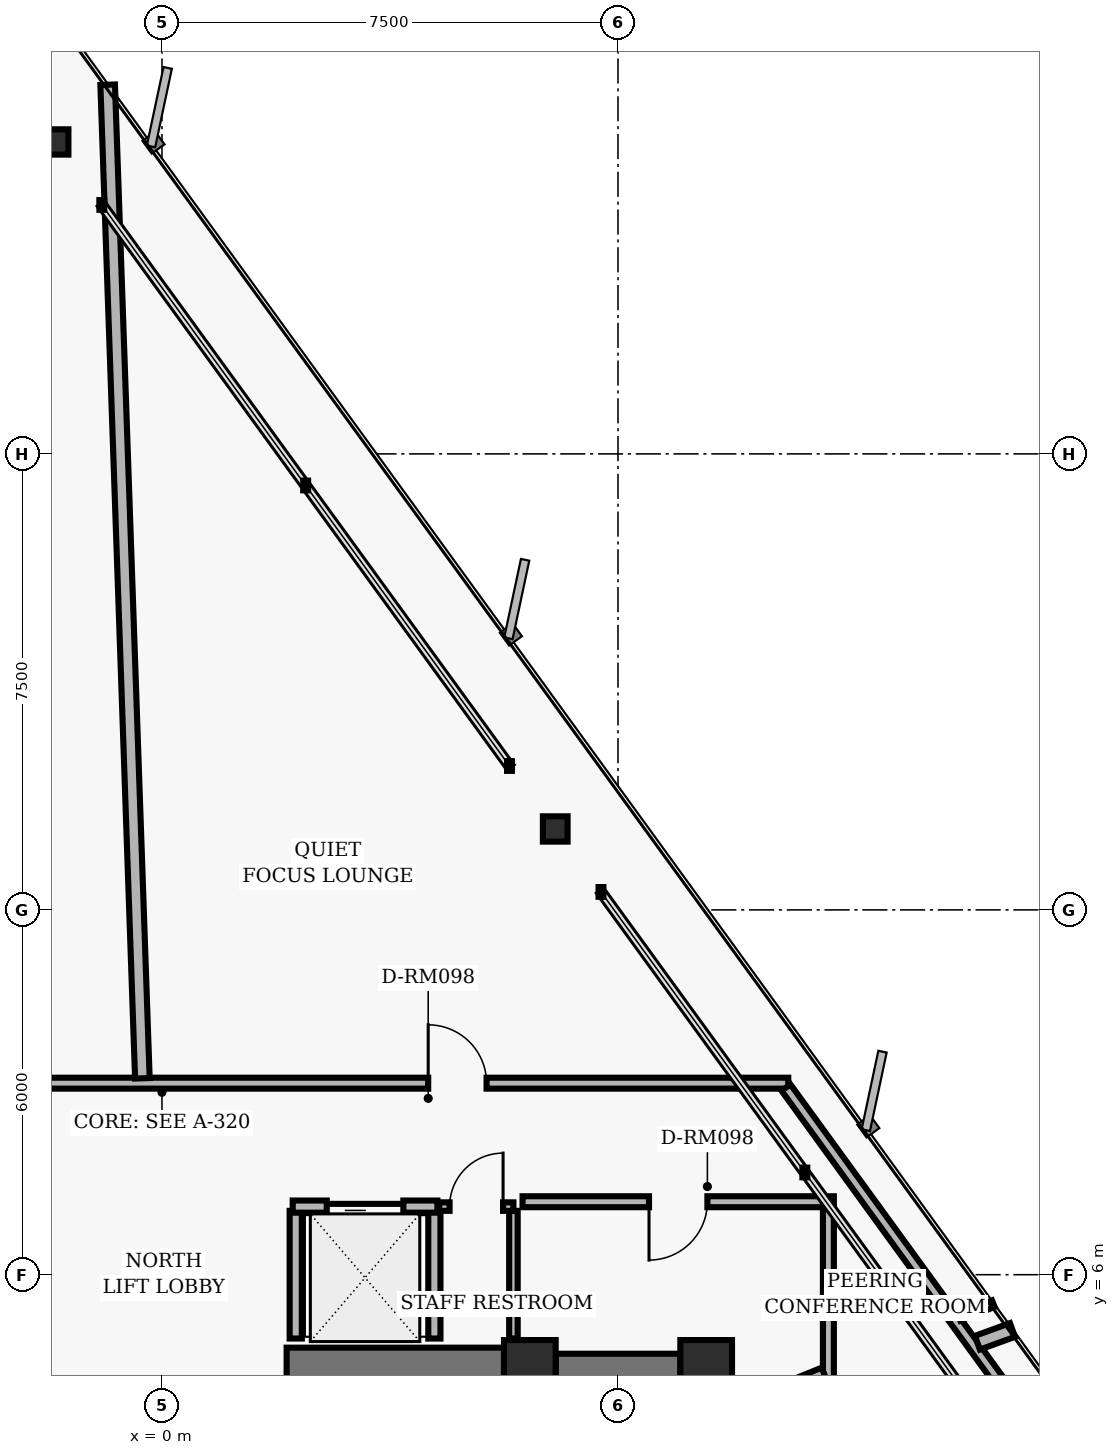
"""IFC4 building model, lengths in metres.
Left out: names, types, materials, properties, quantities, classifications, styles, units other than length and angle.
Written with IfcOpenShell. Run it as: python <this file> out.ifc"""

import sys

from ifc_helpers import new_model, si_unit, direction, frame, frame_2d, origin, origin_2d, place, context, subcontext, project, spatial, rectangle, hollow_rectangle, i_section, extrude, element, fill, save


model = new_model("IFC4")
c1 = context("Model", 3, precision=1e-05, world=origin(), true_north=direction((0.0, 1.0)))
c2 = subcontext(c1, "Body", "Model", "MODEL_VIEW")
j1 = project(units=[si_unit("LENGTHUNIT", "METRE"), si_unit("PLANEANGLEUNIT", "RADIAN")], contexts=[c1])
p1 = place(None, origin())
s1 = spatial("IfcSite", under=j1, at=p1, CompositionType="ELEMENT")
p2 = place(p1, origin())
s2 = spatial("IfcBuilding", under=s1, at=p2, CompositionType="ELEMENT")
p3 = place(p2, frame((0.0, 0.0, 122.88)))
s3 = spatial("IfcBuildingStorey", under=s2, at=p3, CompositionType="ELEMENT", Elevation=122.88)
for number, where, z_axis, x_axis in (
    (1, (6.05, 4.5, 0.0), (0.0, 0.0, 1.0), (1.0, 0.0, 0.0)),
    (2, (8.95, 4.5, 0.0), (0.0, 0.0, 1.0), (1.0, 0.0, 0.0)),
):
    element("IfcColumn", number, at=place(p3, frame(where, z_axis=z_axis, x_axis=x_axis)), inside=s3, PredefinedType="COLUMN", context=c2, shape_type="SweptSolid", body=[
        extrude(hollow_rectangle(XDim=0.85, YDim=0.85, WallThickness=0.055, InnerFilletRadius=0.02, OuterFilletRadius=0.04, at=origin_2d()), origin(), (0.0, 0.0, 1.0), 3.04),
    ])
p4 = place(p3, frame((2.05, 4.5, 0.0), z_axis=(0.0, 0.0, 1.0), x_axis=(1.0, 0.0, 0.0)))
e3 = element("IfcWall", 3, at=p4, inside=s3, PredefinedType="SHEAR", context=c2, shape_type="SweptSolid", body=[
    extrude(rectangle(XDim=3.575, YDim=0.6, at=frame_2d((1.788, 0.0))), origin(), (0.0, 0.0, 1.0), 2.618),
])
p5 = place(p3, frame((6.475, 4.5, 0.0), z_axis=(0.0, 0.0, 1.0), x_axis=(1.0, 0.0, 0.0)))
e4 = element("IfcWall", 4, at=p5, inside=s3, PredefinedType="SHEAR", context=c2, shape_type="SweptSolid", body=[
    extrude(rectangle(XDim=2.05, YDim=0.4, at=frame_2d((1.025, 0.0))), origin(), (0.0, 0.0, 1.0), 2.618),
])
for number, where, z_axis, x_axis in (
    (5, (6.468, 13.331, 0.0), (0.0, 0.0, 1.0), (1.0, 0.0, 0.0)),
    (6, (-1.742, 24.63, 0.0), (0.0, 0.0, 1.0), (1.0, 0.0, 0.0)),
):
    element("IfcColumn", number, at=place(p3, frame(where, z_axis=z_axis, x_axis=x_axis)), inside=s3, PredefinedType="COLUMN", context=c2, shape_type="SweptSolid", body=[
        extrude(i_section(OverallWidth=0.406, OverallDepth=0.416, WebThickness=0.03, FlangeThickness=0.048, FilletRadius=0.02, at=origin_2d()), origin(), (0.0, 0.0, 1.0), 3.04),
    ])
p6 = place(p3, frame((2.2, 4.95, 0.0), z_axis=(0.0, 0.0, 1.0), x_axis=(0.0, 1.0, 0.0)))
e7 = element("IfcWall", 7, at=p6, inside=s3, PredefinedType="PARTITIONING", context=c2, shape_type="SweptSolid", body=[
    extrude(rectangle(XDim=2.1, YDim=0.2, at=frame_2d((1.05, 0.0))), origin(), (0.0, 0.0, 1.0), 1.962),
])
p7 = place(p3, frame((4.48, 4.95, 0.0), z_axis=(0.0, 0.0, 1.0), x_axis=(0.0, 1.0, 0.0)))
e8 = element("IfcWall", 8, at=p7, inside=s3, PredefinedType="PARTITIONING", context=c2, shape_type="SweptSolid", body=[
    extrude(rectangle(XDim=2.1, YDim=0.2, at=frame_2d((1.05, 0.0))), origin(), (0.0, 0.0, 1.0), 2.593),
])
p8 = place(p3, frame((2.15, 7.12, 0.0), z_axis=(0.0, 0.0, 1.0), x_axis=(1.0, 0.0, 0.0)))
e9 = element("IfcWall", 9, at=p8, inside=s3, PredefinedType="PARTITIONING", context=c2, shape_type="SweptSolid", body=[
    extrude(rectangle(XDim=2.38, YDim=0.2, at=frame_2d((1.19, 0.0))), origin(), (0.0, 0.0, 1.0), 2.593),
])
p9 = place(p8, frame((0.56, 0.0, 0.0)))
e10 = element("IfcOpeningElement", 10, at=p9, cuts=e9, PredefinedType="OPENING", context=c2, shape_type="SweptSolid", body=[
    extrude(rectangle(XDim=1.26, YDim=2.06, at=frame_2d((0.63, 1.03))), frame((0.0, 0.11, 0.0), z_axis=(0.0, -1.0, 0.0), x_axis=(1.0, 0.0, 0.0)), (0.0, 0.0, 1.0), 0.22),
])
p10 = place(p3, frame((5.78, 4.95, 0.0), z_axis=(0.0, 0.0, 1.0), x_axis=(0.0, 1.0, 0.0)))
e11 = element("IfcWall", 11, at=p10, inside=s3, PredefinedType="PARTITIONING", context=c2, shape_type="SweptSolid", body=[
    extrude(rectangle(XDim=2.1, YDim=0.14, at=frame_2d((1.05, 0.0))), origin(), (0.0, 0.0, 1.0), 1.962),
])
p11 = place(p3, frame((4.56, 7.12, 0.0), z_axis=(0.0, 0.0, 1.0), x_axis=(1.0, 0.0, 0.0)))
e12 = element("IfcWall", 12, at=p11, inside=s3, PredefinedType="PARTITIONING", context=c2, shape_type="SweptSolid", body=[
    extrude(rectangle(XDim=1.22, YDim=0.14, at=frame_2d((0.61, 0.0))), origin(), (0.0, 0.0, 1.0), 2.593),
])
p12 = place(p11, frame((0.17, 0.0, 0.0)))
e13 = element("IfcOpeningElement", 13, at=p12, cuts=e12, PredefinedType="OPENING", context=c2, shape_type="SweptSolid", body=[
    extrude(rectangle(XDim=0.88, YDim=2.02, at=frame_2d((0.44, 1.01))), frame((0.0, 0.08, 0.0), z_axis=(0.0, -1.0, 0.0), x_axis=(1.0, 0.0, 0.0)), (0.0, 0.0, 1.0), 0.16),
])
p13 = place(p3, frame((-6.52, 9.15, 0.0), z_axis=(0.0, 0.0, 1.0), x_axis=(1.0, 0.0, 0.0)))
e14 = element("IfcWall", 14, at=p13, inside=s3, PredefinedType="PARTITIONING", context=c2, shape_type="SweptSolid", body=[
    extrude(rectangle(XDim=16.82, YDim=0.18, at=frame_2d((8.41, 0.0))), origin(), (0.0, 0.0, 1.0), 2.593),
])
p14 = place(p13, frame((10.898, 0.0, 0.0)))
e15 = element("IfcOpeningElement", 15, at=p14, cuts=e14, PredefinedType="OPENING", context=c2, shape_type="SweptSolid", body=[
    extrude(rectangle(XDim=0.96, YDim=2.02, at=frame_2d((0.48, 1.01))), frame((0.0, 0.1, 0.0), z_axis=(0.0, -1.0, 0.0), x_axis=(1.0, 0.0, 0.0)), (0.0, 0.0, 1.0), 0.2),
])
p15 = place(p13, frame((2.749, 0.0, 0.0)))
e16 = element("IfcOpeningElement", 16, at=p15, cuts=e14, PredefinedType="OPENING", context=c2, shape_type="SweptSolid", body=[
    extrude(rectangle(XDim=0.96, YDim=2.02, at=frame_2d((0.48, 1.01))), frame((0.0, 0.1, 0.0), z_axis=(0.0, -1.0, 0.0), x_axis=(1.0, 0.0, 0.0)), (0.0, 0.0, 1.0), 0.2),
])
p16 = place(p3, frame((10.263, 9.077, 0.0), z_axis=(0.0, 0.0, 1.0), x_axis=(0.587780951295, -0.809020119215, 0.0)))
e17 = element("IfcWall", 17, at=p16, inside=s3, PredefinedType="PARTITIONING", context=c2, shape_type="SweptSolid", body=[
    extrude(rectangle(XDim=7.469, YDim=0.18, at=frame_2d((3.734, 0.0))), origin(), (0.0, 0.0, 1.0), 2.593),
])
p17 = place(p3, frame((10.96, 3.84, 0.0), z_axis=(0.0, 0.0, 1.0), x_axis=(0.0, 1.0, 0.0)))
e18 = element("IfcWall", 18, at=p17, inside=s3, PredefinedType="PARTITIONING", context=c2, shape_type="SweptSolid", body=[
    extrude(rectangle(XDim=3.271, YDim=0.18, at=frame_2d((1.635, 0.0))), origin(), (0.0, 0.0, 1.0), 2.593),
])
p18 = place(p3, frame((11.05, 7.2, 0.0), z_axis=(0.0, 0.0, 1.0), x_axis=(-1.0, 0.0, 0.0)))
e19 = element("IfcWall", 19, at=p18, inside=s3, PredefinedType="PARTITIONING", context=c2, shape_type="SweptSolid", body=[
    extrude(rectangle(XDim=5.12, YDim=0.18, at=frame_2d((2.56, 0.0))), origin(), (0.0, 0.0, 1.0), 2.593),
])
p19 = place(p18, frame((2.08, 0.0, 0.0)))
e20 = element("IfcOpeningElement", 20, at=p19, cuts=e19, PredefinedType="OPENING", context=c2, shape_type="SweptSolid", body=[
    extrude(rectangle(XDim=0.96, YDim=2.02, at=frame_2d((0.48, 1.01))), frame((0.0, 0.1, 0.0), z_axis=(0.0, -1.0, 0.0), x_axis=(1.0, 0.0, 0.0)), (0.0, 0.0, 1.0), 0.2),
])
p20 = place(p3, frame((13.41, 4.881, 0.0), z_axis=(0.0, 0.0, 1.0), x_axis=(0.939828255983, 0.341647258523, 0.0)))
e21 = element("IfcWall", 21, at=p20, inside=s3, PredefinedType="PARTITIONING", context=c2, shape_type="SweptSolid", body=[
    extrude(rectangle(XDim=0.614, YDim=0.24, at=frame_2d((0.307, 0.0))), origin(), (0.0, 0.0, 1.0), 2.593),
])
p21 = place(p3, frame((10.024, 4.05, 0.0), z_axis=(0.0, 0.0, 1.0), x_axis=(0.927194137639, 0.374581140912, 0.0)))
e22 = element("IfcWall", 22, at=p21, inside=s3, PredefinedType="PARTITIONING", context=c2, shape_type="SweptSolid", body=[
    extrude(rectangle(XDim=0.923, YDim=0.16, at=frame_2d((0.461, 0.0))), origin(), (0.0, 0.0, 1.0), 2.593),
])
p22 = place(p3, frame((13.109, 5.296, 0.0), z_axis=(0.0, 0.0, 1.0), x_axis=(0.927169426613, 0.374642301875, 0.0)))
e23 = element("IfcWall", 23, at=p22, inside=s3, PredefinedType="MOVABLE", context=c2, shape_type="SweptSolid", body=[
    extrude(rectangle(XDim=0.608, YDim=0.115, at=frame_2d((0.304, 0.0))), origin(), (0.0, 0.0, 1.0), 2.593),
])
p23 = place(p3, frame((-0.322, 9.23, 0.0), z_axis=(0.0, 0.0, 1.0), x_axis=(-0.034907078812, 0.999390562217, 0.0)))
e24 = element("IfcWall", 24, at=p23, inside=s3, PredefinedType="PARTITIONING", context=c2, shape_type="SweptSolid", body=[
    extrude(rectangle(XDim=16.352, YDim=0.24, at=frame_2d((8.176, 0.0))), origin(), (0.0, 0.0, 1.0), 1.962),
])
p24 = place(p9, origin())
e25 = element("IfcDoor", 25, at=p24, inside=s3, OperationType="SLIDING_TO_LEFT", PredefinedType="DOOR", context=c2, shape_type="SweptSolid", body=[
    extrude(rectangle(XDim=1.26, YDim=2.06, at=frame_2d((0.63, 1.03))), frame((0.0, 0.025, 0.0), z_axis=(0.0, -1.0, 0.0), x_axis=(1.0, 0.0, 0.0)), (0.0, 0.0, 1.0), 0.05),
])
fill(e10, e25)
p25 = place(p12, origin())
e26 = element("IfcDoor", 26, at=p25, inside=s3, OperationType="SINGLE_SWING_RIGHT", PredefinedType="DOOR", context=c2, shape_type="SweptSolid", body=[
    extrude(rectangle(XDim=0.88, YDim=2.02, at=frame_2d((0.44, 1.01))), frame((0.0, 0.025, 0.0), z_axis=(0.0, -1.0, 0.0), x_axis=(1.0, 0.0, 0.0)), (0.0, 0.0, 1.0), 0.05),
])
fill(e13, e26)
p26 = place(p19, origin())
e27 = element("IfcDoor", 27, at=p26, inside=s3, OperationType="SINGLE_SWING_RIGHT", PredefinedType="DOOR", context=c2, shape_type="SweptSolid", body=[
    extrude(rectangle(XDim=0.96, YDim=2.02, at=frame_2d((0.48, 1.01))), frame((0.0, 0.025, 0.0), z_axis=(0.0, -1.0, 0.0), x_axis=(1.0, 0.0, 0.0)), (0.0, 0.0, 1.0), 0.05),
])
fill(e20, e27)
p27 = place(p14, origin())
e28 = element("IfcDoor", 28, at=p27, inside=s3, OperationType="SINGLE_SWING_LEFT", PredefinedType="DOOR", context=c2, shape_type="SweptSolid", body=[
    extrude(rectangle(XDim=0.96, YDim=2.02, at=frame_2d((0.48, 1.01))), frame((0.0, 0.025, 0.0), z_axis=(0.0, -1.0, 0.0), x_axis=(1.0, 0.0, 0.0)), (0.0, 0.0, 1.0), 0.05),
])
fill(e15, e28)
save(model, sys.argv[1])
